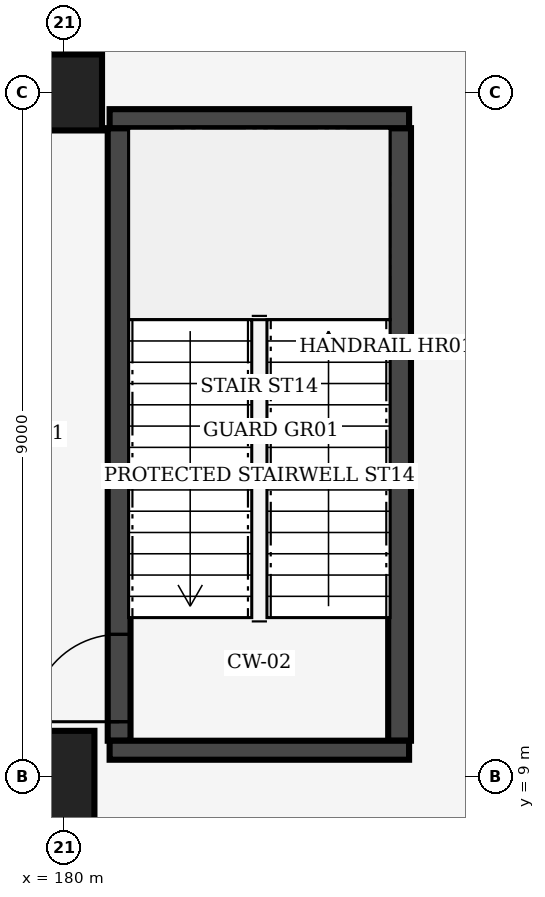
"""IFC4 building model, lengths in metres.
Left out: names, types, materials, properties, quantities, classifications, styles, units other than length and angle.
Written with IfcOpenShell. Run it as: python <this file> out.ifc"""

import sys

from ifc_helpers import new_model, si_unit, direction, frame, frame_2d, origin, origin_2d, place, context, subcontext, project, spatial, rectangle, extrude, element, fill, save


model = new_model("IFC4")
c1 = context("Model", 3, precision=1e-05, world=origin(), true_north=direction((0.0, 1.0)))
c2 = subcontext(c1, "Body", "Model", "MODEL_VIEW")
j1 = project(units=[si_unit("LENGTHUNIT", "METRE"), si_unit("PLANEANGLEUNIT", "RADIAN")], contexts=[c1])
p1 = place(None, origin())
s1 = spatial("IfcSite", under=j1, at=p1, CompositionType="ELEMENT")
p2 = place(p1, origin())
s2 = spatial("IfcBuilding", under=s1, at=p2, CompositionType="ELEMENT")
p3 = place(p2, frame((0.0, 0.0, -5.0)))
s3 = spatial("IfcBuildingStorey", under=s2, at=p3, CompositionType="ELEMENT", Elevation=-5.0)
p4 = place(p3, frame((180.0, 9.0, 0.0), z_axis=(0.0, 0.0, 1.0), x_axis=(1.0, 0.0, 0.0)))
e1 = element("IfcColumn", 1, at=p4, inside=s3, PredefinedType="COLUMN", context=c2, shape_type="SweptSolid", body=[
    extrude(rectangle(XDim=0.8, YDim=1.2, at=origin_2d()), origin(), (0.0, 0.0, 1.0), 5.0),
])
p5 = place(p3, frame((180.0, 18.0, 0.0), z_axis=(0.0, 0.0, 1.0), x_axis=(1.0, 0.0, 0.0)))
e2 = element("IfcColumn", 2, at=p5, inside=s3, PredefinedType="COLUMN", context=c2, shape_type="SweptSolid", body=[
    extrude(rectangle(XDim=1.0, YDim=1.0, at=origin_2d()), origin(), (0.0, 0.0, 1.0), 5.0),
])
p6 = place(p3, frame((180.725, 9.47, 0.0), z_axis=(0.0, 0.0, 1.0), x_axis=(0.0, 1.0, 0.0)))
e3 = element("IfcWall", 3, at=p6, inside=s3, PredefinedType="SHEAR", context=c2, shape_type="SweptSolid", body=[
    extrude(rectangle(XDim=8.06, YDim=0.3, at=frame_2d((4.03, 0.0))), origin(), (0.0, 0.0, 1.0), 4.64),
])
p7 = place(p6, frame((0.25, 0.0, 0.0)))
e4 = element("IfcOpeningElement", 4, at=p7, cuts=e3, PredefinedType="OPENING", context=c2, shape_type="SweptSolid", body=[
    extrude(rectangle(XDim=1.15, YDim=2.15, at=frame_2d((0.575, 1.075))), frame((0.0, 0.16, 0.0), z_axis=(0.0, -1.0, 0.0), x_axis=(1.0, 0.0, 0.0)), (0.0, 0.0, 1.0), 0.32),
])
p8 = place(p3, frame((184.415, 9.47, 0.0), z_axis=(0.0, 0.0, 1.0), x_axis=(0.0, 1.0, 0.0)))
e5 = element("IfcWall", 5, at=p8, inside=s3, PredefinedType="SHEAR", context=c2, shape_type="SweptSolid", body=[
    extrude(rectangle(XDim=8.06, YDim=0.3, at=frame_2d((4.03, 0.0))), origin(), (0.0, 0.0, 1.0), 4.64),
])
for number, where, z_axis, x_axis in (
    (6, (180.6, 9.345, 0.0), (0.0, 0.0, 1.0), (1.0, 0.0, 0.0)),
    (7, (180.6, 17.655, 0.0), (0.0, 0.0, 1.0), (1.0, 0.0, 0.0)),
):
    element("IfcWall", number, at=place(p3, frame(where, z_axis=z_axis, x_axis=x_axis)), inside=s3, PredefinedType="SHEAR", context=c2, shape_type="SweptSolid", body=[
        extrude(rectangle(XDim=3.94, YDim=0.25, at=frame_2d((1.97, 0.0))), origin(), (0.0, 0.0, 1.0), 4.64),
    ])
p9 = place(p7, origin())
e8 = element("IfcDoor", 8, at=p9, inside=s3, OperationType="SINGLE_SWING_LEFT", PredefinedType="DOOR", context=c2, shape_type="SweptSolid", body=[
    extrude(rectangle(XDim=1.15, YDim=2.15, at=frame_2d((0.575, 1.075))), frame((0.0, 0.025, 0.0), z_axis=(0.0, -1.0, 0.0), x_axis=(1.0, 0.0, 0.0)), (0.0, 0.0, 1.0), 0.05),
])
fill(e4, e8)
save(model, sys.argv[1])
